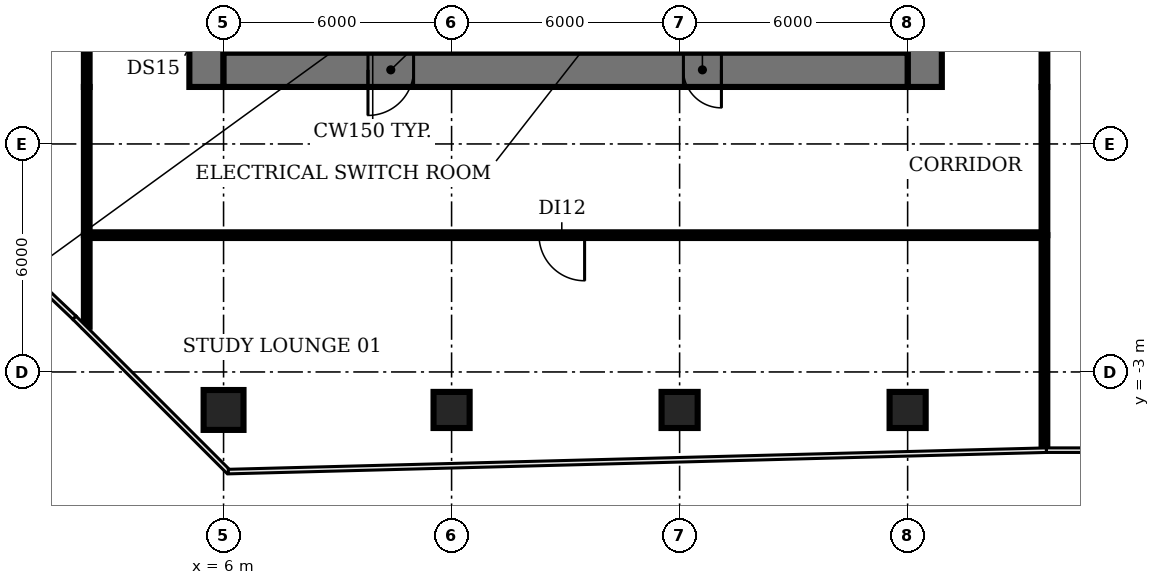
"""IFC4 building model, lengths in metres.
Left out: names, types, materials, properties, quantities, classifications, styles, units other than length and angle.
Written with IfcOpenShell. Run it as: python <this file> out.ifc"""

import sys

from ifc_helpers import new_model, si_unit, direction, frame, frame_2d, origin, origin_2d, place, context, subcontext, project, spatial, rectangle, circle, extrude, element, fill, save


model = new_model("IFC4")
c1 = context("Model", 3, precision=1e-05, world=origin(), true_north=direction((0.0, 1.0)))
c2 = subcontext(c1, "Body", "Model", "MODEL_VIEW")
j1 = project(units=[si_unit("LENGTHUNIT", "METRE"), si_unit("PLANEANGLEUNIT", "RADIAN")], contexts=[c1])
p1 = place(None, origin())
s1 = spatial("IfcSite", under=j1, at=p1, CompositionType="ELEMENT")
p2 = place(p1, origin())
s2 = spatial("IfcBuilding", under=s1, at=p2, CompositionType="ELEMENT")
p3 = place(p2, frame((0.0, 0.0, 58.4)))
s3 = spatial("IfcBuildingStorey", under=s2, at=p3, CompositionType="ELEMENT", Elevation=58.4)
p4 = place(p3, frame((6.0, -4.0, 0.0), z_axis=(0.0, 0.0, 1.0), x_axis=(1.0, 0.0, 0.0)))
e1 = element("IfcColumn", 1, at=p4, inside=s3, PredefinedType="COLUMN", context=c2, shape_type="SweptSolid", body=[
    extrude(circle(Radius=0.525, at=origin_2d()), origin(), (0.0, 0.0, 1.0), 3.85),
])
for number, where, z_axis, x_axis in (
    (2, (12.0, -4.0, 0.0), (0.0, 0.0, 1.0), (1.0, 0.0, 0.0)),
    (3, (18.0, -4.0, 0.0), (0.0, 0.0, 1.0), (1.0, 0.0, 0.0)),
    (4, (24.0, -4.0, 0.0), (0.0, 0.0, 1.0), (1.0, 0.0, 0.0)),
):
    element("IfcColumn", number, at=place(p3, frame(where, z_axis=z_axis, x_axis=x_axis)), inside=s3, PredefinedType="COLUMN", context=c2, shape_type="SweptSolid", body=[
        extrude(rectangle(XDim=0.95, YDim=0.95, at=origin_2d()), origin(), (0.0, 0.0, 1.0), 3.85),
    ])
p5 = place(p3, frame((9.275, 11.825, 0.0), z_axis=(0.0, 0.0, 1.0), x_axis=(0.0, -1.0, 0.0)))
e5 = element("IfcWall", 5, at=p5, inside=s3, PredefinedType="SHEAR", context=c2, shape_type="SweptSolid", body=[
    extrude(rectangle(XDim=6.425, YDim=0.25, at=frame_2d((3.212, 0.0))), origin(), (0.0, 0.0, 1.0), 3.85),
])
p6 = place(p5, frame((5.075, 0.0, 0.0)))
e6 = element("IfcOpeningElement", 6, at=p6, cuts=e5, PredefinedType="OPENING", context=c2, shape_type="SweptSolid", body=[
    extrude(rectangle(XDim=1.0, YDim=2.1, at=frame_2d((0.5, 1.05))), frame((0.0, 0.135, 0.0), z_axis=(0.0, -1.0, 0.0), x_axis=(1.0, 0.0, 0.0)), (0.0, 0.0, 1.0), 0.27),
])
p7 = place(p3, frame((13.5, 5.4, 0.0), z_axis=(0.0, 0.0, 1.0), x_axis=(0.0, 1.0, 0.0)))
e7 = element("IfcWall", 7, at=p7, inside=s3, PredefinedType="SHEAR", context=c2, shape_type="SweptSolid", body=[
    extrude(rectangle(XDim=8.2, YDim=0.2, at=frame_2d((4.1, 0.0))), origin(), (0.0, 0.0, 1.0), 3.85),
])
p8 = place(p7, frame((0.75, 0.0, 0.0)))
e8 = element("IfcOpeningElement", 8, at=p8, cuts=e7, PredefinedType="OPENING", context=c2, shape_type="SweptSolid", body=[
    extrude(rectangle(XDim=1.1, YDim=2.1, at=frame_2d((0.55, 1.05))), frame((0.0, 0.11, 0.0), z_axis=(0.0, -1.0, 0.0), x_axis=(1.0, 0.0, 0.0)), (0.0, 0.0, 1.0), 0.22),
])
p9 = place(p7, frame((3.55, 0.0, 0.0)))
e9 = element("IfcOpeningElement", 9, at=p9, cuts=e7, PredefinedType="OPENING", context=c2, shape_type="SweptSolid", body=[
    extrude(rectangle(XDim=1.1, YDim=2.1, at=frame_2d((0.55, 1.05))), frame((0.0, 0.11, 0.0), z_axis=(0.0, -1.0, 0.0), x_axis=(1.0, 0.0, 0.0)), (0.0, 0.0, 1.0), 0.22),
])
p10 = place(p7, frame((6.35, 0.0, 0.0)))
e10 = element("IfcOpeningElement", 10, at=p10, cuts=e7, PredefinedType="OPENING", context=c2, shape_type="SweptSolid", body=[
    extrude(rectangle(XDim=1.1, YDim=2.1, at=frame_2d((0.55, 1.05))), frame((0.0, 0.11, 0.0), z_axis=(0.0, -1.0, 0.0), x_axis=(1.0, 0.0, 0.0)), (0.0, 0.0, 1.0), 0.22),
])
p11 = place(p3, frame((16.5, 5.4, 0.0), z_axis=(0.0, 0.0, 1.0), x_axis=(0.0, 1.0, 0.0)))
e11 = element("IfcWall", 11, at=p11, inside=s3, PredefinedType="SHEAR", context=c2, shape_type="SweptSolid", body=[
    extrude(rectangle(XDim=8.2, YDim=0.2, at=frame_2d((4.1, 0.0))), origin(), (0.0, 0.0, 1.0), 3.85),
])
p12 = place(p3, frame((20.725, 5.4, 0.0), z_axis=(0.0, 0.0, 1.0), x_axis=(0.0, 1.0, 0.0)))
e12 = element("IfcWall", 12, at=p12, inside=s3, PredefinedType="SHEAR", context=c2, shape_type="SweptSolid", body=[
    extrude(rectangle(XDim=6.3, YDim=0.25, at=frame_2d((3.15, 0.0))), origin(), (0.0, 0.0, 1.0), 3.85),
])
p13 = place(p3, frame((5.55, 4.5, 0.0), z_axis=(0.0, 0.0, 1.0), x_axis=(0.0, 1.0, 0.0)))
e13 = element("IfcWall", 13, at=p13, inside=s3, PredefinedType="SHEAR", context=c2, shape_type="SweptSolid", body=[
    extrude(rectangle(XDim=21.2, YDim=0.9, at=frame_2d((10.6, 0.0))), origin(), (0.0, 0.0, 1.0), 3.85),
])
p14 = place(p13, frame((1.15, 0.0, 0.0)))
e14 = element("IfcOpeningElement", 14, at=p14, cuts=e13, PredefinedType="OPENING", context=c2, shape_type="SweptSolid", body=[
    extrude(rectangle(XDim=1.5, YDim=2.1, at=frame_2d((0.75, 1.05))), frame((0.0, 0.46, 0.0), z_axis=(0.0, -1.0, 0.0), x_axis=(1.0, 0.0, 0.0)), (0.0, 0.0, 1.0), 0.92),
])
p15 = place(p13, frame((7.6, 0.0, 0.0)))
e15 = element("IfcOpeningElement", 15, at=p15, cuts=e13, PredefinedType="OPENING", context=c2, shape_type="SweptSolid", body=[
    extrude(rectangle(XDim=1.2, YDim=2.1, at=frame_2d((0.6, 1.05))), frame((0.0, 0.46, 0.0), z_axis=(0.0, -1.0, 0.0), x_axis=(1.0, 0.0, 0.0)), (0.0, 0.0, 1.0), 0.92),
])
p16 = place(p13, frame((14.15, 0.0, 0.0)))
e16 = element("IfcOpeningElement", 16, at=p16, cuts=e13, PredefinedType="OPENING", context=c2, shape_type="SweptSolid", body=[
    extrude(rectangle(XDim=1.2, YDim=2.1, at=frame_2d((0.6, 1.05))), frame((0.0, 0.46, 0.0), z_axis=(0.0, -1.0, 0.0), x_axis=(1.0, 0.0, 0.0)), (0.0, 0.0, 1.0), 0.92),
])
p17 = place(p3, frame((24.45, 25.7, 0.0), z_axis=(0.0, 0.0, 1.0), x_axis=(0.0, -1.0, 0.0)))
e17 = element("IfcWall", 17, at=p17, inside=s3, PredefinedType="SHEAR", context=c2, shape_type="SweptSolid", body=[
    extrude(rectangle(XDim=21.2, YDim=0.9, at=frame_2d((10.6, 0.0))), origin(), (0.0, 0.0, 1.0), 3.85),
])
p18 = place(p17, frame((18.55, 0.0, 0.0)))
e18 = element("IfcOpeningElement", 18, at=p18, cuts=e17, PredefinedType="OPENING", context=c2, shape_type="SweptSolid", body=[
    extrude(rectangle(XDim=1.5, YDim=2.1, at=frame_2d((0.75, 1.05))), frame((0.0, 0.46, 0.0), z_axis=(0.0, -1.0, 0.0), x_axis=(1.0, 0.0, 0.0)), (0.0, 0.0, 1.0), 0.92),
])
p19 = place(p17, frame((12.45, 0.0, 0.0)))
e19 = element("IfcOpeningElement", 19, at=p19, cuts=e17, PredefinedType="OPENING", context=c2, shape_type="SweptSolid", body=[
    extrude(rectangle(XDim=0.9, YDim=2.1, at=frame_2d((0.45, 1.05))), frame((0.0, 0.46, 0.0), z_axis=(0.0, -1.0, 0.0), x_axis=(1.0, 0.0, 0.0)), (0.0, 0.0, 1.0), 0.92),
])
p20 = place(p17, frame((6.45, 0.0, 0.0)))
e20 = element("IfcOpeningElement", 20, at=p20, cuts=e17, PredefinedType="OPENING", context=c2, shape_type="SweptSolid", body=[
    extrude(rectangle(XDim=2.0, YDim=2.1, at=frame_2d((1.0, 1.05))), frame((0.0, 0.46, 0.0), z_axis=(0.0, -1.0, 0.0), x_axis=(1.0, 0.0, 0.0)), (0.0, 0.0, 1.0), 0.92),
])
p21 = place(p3, frame((24.0, 4.95, 0.0), z_axis=(0.0, 0.0, 1.0), x_axis=(-1.0, 0.0, 0.0)))
e21 = element("IfcWall", 21, at=p21, inside=s3, PredefinedType="SHEAR", context=c2, shape_type="SweptSolid", body=[
    extrude(rectangle(XDim=18.0, YDim=0.9, at=frame_2d((9.0, 0.0))), origin(), (0.0, 0.0, 1.0), 3.85),
])
p22 = place(p21, frame((13.0, 0.0, 0.0)))
e22 = element("IfcOpeningElement", 22, at=p22, cuts=e21, PredefinedType="OPENING", context=c2, shape_type="SweptSolid", body=[
    extrude(rectangle(XDim=1.2, YDim=2.1, at=frame_2d((0.6, 1.05))), frame((0.0, 0.46, 0.0), z_axis=(0.0, -1.0, 0.0), x_axis=(1.0, 0.0, 0.0)), (0.0, 0.0, 1.0), 0.92),
])
p23 = place(p21, frame((4.9, 0.0, 0.0)))
e23 = element("IfcOpeningElement", 23, at=p23, cuts=e21, PredefinedType="OPENING", context=c2, shape_type="SweptSolid", body=[
    extrude(rectangle(XDim=1.0, YDim=2.1, at=frame_2d((0.5, 1.05))), frame((0.0, 0.46, 0.0), z_axis=(0.0, -1.0, 0.0), x_axis=(1.0, 0.0, 0.0)), (0.0, 0.0, 1.0), 0.92),
])
p24 = place(p3, frame((2.4, -1.81, 0.0), z_axis=(0.0, 0.0, 1.0), x_axis=(0.0, 1.0, 0.0)))
e24 = element("IfcWall", 24, at=p24, inside=s3, PredefinedType="PARTITIONING", context=c2, shape_type="SweptSolid", body=[
    extrude(rectangle(XDim=2.41, YDim=0.15, at=frame_2d((1.205, 0.0))), origin(), (0.0, 0.0, 1.0), 2.83),
])
p25 = place(p3, frame((2.4, 0.6, 0.0), z_axis=(0.0, 0.0, 1.0), x_axis=(0.0, 1.0, 0.0)))
e25 = element("IfcWall", 25, at=p25, inside=s3, PredefinedType="PARTITIONING", context=c2, shape_type="SweptSolid", body=[
    extrude(rectangle(XDim=3.9, YDim=0.15, at=frame_2d((1.95, 0.0))), origin(), (0.0, 0.0, 1.0), 2.83),
])
p26 = place(p3, frame((2.4, 4.5, 0.0), z_axis=(0.0, 0.0, 1.0), x_axis=(0.0, 1.0, 0.0)))
e26 = element("IfcWall", 26, at=p26, inside=s3, PredefinedType="PARTITIONING", context=c2, shape_type="SweptSolid", body=[
    extrude(rectangle(XDim=21.2, YDim=0.15, at=frame_2d((10.6, 0.0))), origin(), (0.0, 0.0, 1.0), 2.83),
])
p27 = place(p26, frame((10.8, 0.0, 0.0)))
e27 = element("IfcOpeningElement", 27, at=p27, cuts=e26, PredefinedType="OPENING", context=c2, shape_type="SweptSolid", body=[
    extrude(rectangle(XDim=1.2, YDim=2.1, at=frame_2d((0.6, 1.05))), frame((0.0, 0.085, 0.0), z_axis=(0.0, -1.0, 0.0), x_axis=(1.0, 0.0, 0.0)), (0.0, 0.0, 1.0), 0.17),
])
p28 = place(p3, frame((27.6, -4.993, 0.0), z_axis=(0.0, 0.0, 1.0), x_axis=(0.0, 1.0, 0.0)))
e28 = element("IfcWall", 28, at=p28, inside=s3, PredefinedType="PARTITIONING", context=c2, shape_type="SweptSolid", body=[
    extrude(rectangle(XDim=5.593, YDim=0.15, at=frame_2d((2.796, 0.0))), origin(), (0.0, 0.0, 1.0), 2.83),
])
p29 = place(p3, frame((27.6, 0.6, 0.0), z_axis=(0.0, 0.0, 1.0), x_axis=(-1.0, 0.0, 0.0)))
e29 = element("IfcWall", 29, at=p29, inside=s3, PredefinedType="PARTITIONING", context=c2, shape_type="SweptSolid", body=[
    extrude(rectangle(XDim=25.2, YDim=0.15, at=frame_2d((12.6, 0.0))), origin(), (0.0, 0.0, 1.0), 2.83),
])
p30 = place(p29, frame((12.1, 0.0, 0.0)))
e30 = element("IfcOpeningElement", 30, at=p30, cuts=e29, PredefinedType="OPENING", context=c2, shape_type="SweptSolid", body=[
    extrude(rectangle(XDim=1.2, YDim=2.1, at=frame_2d((0.6, 1.05))), frame((0.0, 0.085, 0.0), z_axis=(0.0, -1.0, 0.0), x_axis=(1.0, 0.0, 0.0)), (0.0, 0.0, 1.0), 0.17),
])
p31 = place(p3, frame((27.6, 0.6, 0.0), z_axis=(0.0, 0.0, 1.0), x_axis=(0.0, 1.0, 0.0)))
e31 = element("IfcWall", 31, at=p31, inside=s3, PredefinedType="PARTITIONING", context=c2, shape_type="SweptSolid", body=[
    extrude(rectangle(XDim=3.9, YDim=0.15, at=frame_2d((1.95, 0.0))), origin(), (0.0, 0.0, 1.0), 2.83),
])
p32 = place(p3, frame((27.6, 15.0, 0.0), z_axis=(0.0, 0.0, 1.0), x_axis=(0.0, -1.0, 0.0)))
e32 = element("IfcWall", 32, at=p32, inside=s3, PredefinedType="PARTITIONING", context=c2, shape_type="SweptSolid", body=[
    extrude(rectangle(XDim=10.5, YDim=0.15, at=frame_2d((5.25, 0.0))), origin(), (0.0, 0.0, 1.0), 2.83),
])
p33 = place(p32, frame((4.8, 0.0, 0.0)))
e33 = element("IfcOpeningElement", 33, at=p33, cuts=e32, PredefinedType="OPENING", context=c2, shape_type="SweptSolid", body=[
    extrude(rectangle(XDim=1.0, YDim=2.1, at=frame_2d((0.5, 1.05))), frame((0.0, 0.085, 0.0), z_axis=(0.0, -1.0, 0.0), x_axis=(1.0, 0.0, 0.0)), (0.0, 0.0, 1.0), 0.17),
])
p34 = place(p22, origin())
e34 = element("IfcDoor", 34, at=p34, inside=s3, OperationType="SINGLE_SWING_RIGHT", PredefinedType="DOOR", context=c2, shape_type="SweptSolid", body=[
    extrude(rectangle(XDim=1.2, YDim=2.1, at=frame_2d((0.6, 1.05))), frame((0.0, 0.025, 0.0), z_axis=(0.0, -1.0, 0.0), x_axis=(1.0, 0.0, 0.0)), (0.0, 0.0, 1.0), 0.05),
])
fill(e22, e34)
p35 = place(p23, origin())
e35 = element("IfcDoor", 35, at=p35, inside=s3, OperationType="SINGLE_SWING_LEFT", PredefinedType="DOOR", context=c2, shape_type="SweptSolid", body=[
    extrude(rectangle(XDim=1.0, YDim=2.1, at=frame_2d((0.5, 1.05))), frame((0.0, -0.39, 0.0), z_axis=(0.0, -1.0, 0.0), x_axis=(1.0, 0.0, 0.0)), (0.0, 0.0, 1.0), 0.05),
])
fill(e23, e35)
p36 = place(p30, origin())
e36 = element("IfcDoor", 36, at=p36, inside=s3, OperationType="SINGLE_SWING_LEFT", PredefinedType="DOOR", context=c2, shape_type="SweptSolid", body=[
    extrude(rectangle(XDim=1.2, YDim=2.1, at=frame_2d((0.6, 1.05))), frame((0.0, 0.025, 0.0), z_axis=(0.0, -1.0, 0.0), x_axis=(1.0, 0.0, 0.0)), (0.0, 0.0, 1.0), 0.05),
])
fill(e30, e36)
save(model, sys.argv[1])
